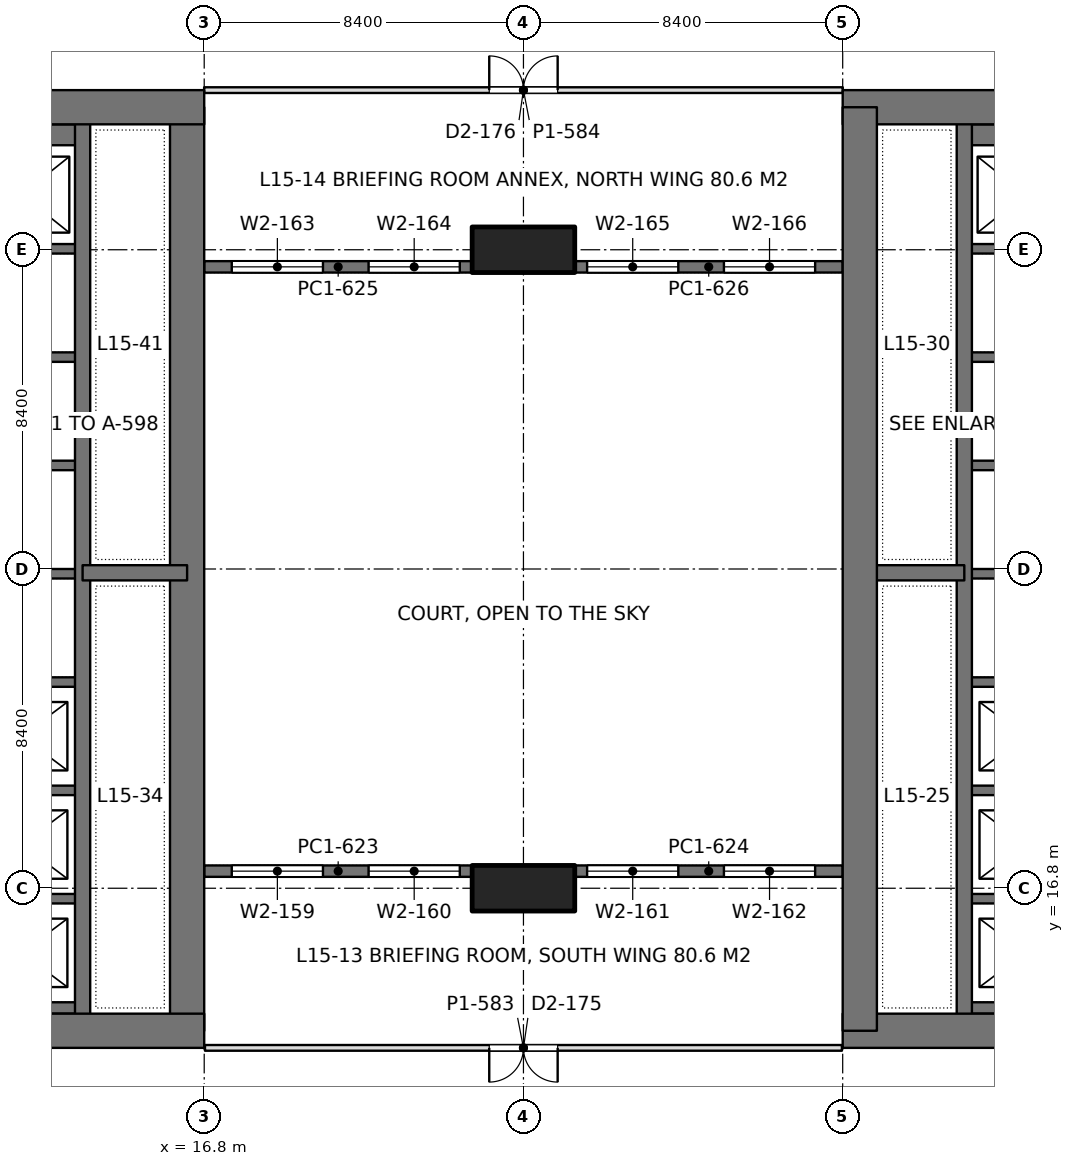
"""IFC4 building model, lengths in metres.
Left out: names, types, materials, properties, quantities, classifications, styles, units other than length and angle.
Written with IfcOpenShell. Run it as: python <this file> out.ifc"""

import sys

from ifc_helpers import new_model, si_unit, direction, frame, frame_2d, origin, origin_2d, place, context, subcontext, project, spatial, rectangle, extrude, element, fill, save


model = new_model("IFC4")
c1 = context("Model", 3, precision=1e-05, world=origin(), true_north=direction((0.0, 1.0)))
c2 = subcontext(c1, "Body", "Model", "MODEL_VIEW")
j1 = project(units=[si_unit("LENGTHUNIT", "METRE"), si_unit("PLANEANGLEUNIT", "RADIAN")], contexts=[c1])
p1 = place(None, origin())
s1 = spatial("IfcSite", under=j1, at=p1, CompositionType="ELEMENT")
p2 = place(p1, origin())
s2 = spatial("IfcBuilding", under=s1, at=p2, CompositionType="ELEMENT")
p3 = place(p2, frame((0.0, 0.0, 68.4)))
s3 = spatial("IfcBuildingStorey", under=s2, at=p3, CompositionType="ELEMENT", Elevation=68.4)
for number, where, z_axis, x_axis in (
    (1, (25.2, 16.8, 0.0), (0.0, 0.0, 1.0), (1.0, 0.0, 0.0)),
    (2, (25.2, 33.6, 0.0), (0.0, 0.0, 1.0), (1.0, 0.0, 0.0)),
):
    element("IfcColumn", number, at=place(p3, frame(where, z_axis=z_axis, x_axis=x_axis)), inside=s3, PredefinedType="COLUMN", context=c2, shape_type="SweptSolid", body=[
        extrude(rectangle(XDim=2.7, YDim=1.2, at=origin_2d()), origin(), (0.0, 0.0, 1.0), 4.5),
    ])
p4 = place(p3, frame((-1.2, 13.05, 0.0), z_axis=(0.0, 0.0, 1.0), x_axis=(1.0, 0.0, 0.0)))
e3 = element("IfcWall", 3, at=p4, inside=s3, PredefinedType="SHEAR", context=c2, shape_type="SweptSolid", body=[
    extrude(rectangle(XDim=18.0, YDim=0.9, at=frame_2d((9.0, 0.0))), origin(), (0.0, 0.0, 1.0), 4.5),
])
p5 = place(p4, frame((8.95, 0.0, 0.0)))
e4 = element("IfcOpeningElement", 4, at=p5, cuts=e3, PredefinedType="OPENING", context=c2, shape_type="SweptSolid", body=[
    extrude(rectangle(XDim=1.8, YDim=2.4, at=frame_2d((0.9, 1.2))), frame((0.0, 0.46, 0.0), z_axis=(0.0, -1.0, 0.0), x_axis=(1.0, 0.0, 0.0)), (0.0, 0.0, 1.0), 0.92),
])
p6 = place(p3, frame((-1.2, 37.35, 0.0), z_axis=(0.0, 0.0, 1.0), x_axis=(1.0, 0.0, 0.0)))
e5 = element("IfcWall", 5, at=p6, inside=s3, PredefinedType="SHEAR", context=c2, shape_type="SweptSolid", body=[
    extrude(rectangle(XDim=18.0, YDim=0.9, at=frame_2d((9.0, 0.0))), origin(), (0.0, 0.0, 1.0), 4.5),
])
p7 = place(p6, frame((8.95, 0.0, 0.0)))
e6 = element("IfcOpeningElement", 6, at=p7, cuts=e5, PredefinedType="OPENING", context=c2, shape_type="SweptSolid", body=[
    extrude(rectangle(XDim=1.8, YDim=2.4, at=frame_2d((0.9, 1.2))), frame((0.0, 0.46, 0.0), z_axis=(0.0, -1.0, 0.0), x_axis=(1.0, 0.0, 0.0)), (0.0, 0.0, 1.0), 0.92),
])
p8 = place(p3, frame((16.35, 13.05, 0.0), z_axis=(0.0, 0.0, 1.0), x_axis=(0.0, 1.0, 0.0)))
e7 = element("IfcWall", 7, at=p8, inside=s3, PredefinedType="SHEAR", context=c2, shape_type="SweptSolid", body=[
    extrude(rectangle(XDim=24.3, YDim=0.9, at=frame_2d((12.15, 0.0))), origin(), (0.0, 0.0, 1.0), 4.5),
])
p9 = place(p3, frame((13.6, 13.05, 0.0), z_axis=(0.0, 0.0, 1.0), x_axis=(0.0, 1.0, 0.0)))
e8 = element("IfcWall", 8, at=p9, inside=s3, PredefinedType="SHEAR", context=c2, shape_type="SweptSolid", body=[
    extrude(rectangle(XDim=24.3, YDim=0.4, at=frame_2d((12.15, 0.0))), origin(), (0.0, 0.0, 1.0), 4.5),
])
p10 = place(p3, frame((13.6, 25.1, 0.0), z_axis=(0.0, 0.0, 1.0), x_axis=(1.0, 0.0, 0.0)))
e9 = element("IfcWall", 9, at=p10, inside=s3, PredefinedType="SHEAR", context=c2, shape_type="SweptSolid", body=[
    extrude(rectangle(XDim=2.75, YDim=0.4, at=frame_2d((1.375, 0.0))), origin(), (0.0, 0.0, 1.0), 4.5),
])
p11 = place(p3, frame((10.4, 13.65, 0.0), z_axis=(0.0, 0.0, 1.0), x_axis=(1.0, 0.0, 0.0)))
e10 = element("IfcWall", 10, at=p11, inside=s3, PredefinedType="SHEAR", context=c2, shape_type="SweptSolid", body=[
    extrude(rectangle(XDim=3.2, YDim=0.3, at=frame_2d((1.6, 0.0))), origin(), (0.0, 0.0, 1.0), 4.5),
])
for number, where, z_axis, x_axis in (
    (11, (10.4, 16.525, 0.0), (0.0, 0.0, 1.0), (1.0, 0.0, 0.0)),
    (12, (10.4, 19.375, 0.0), (0.0, 0.0, 1.0), (1.0, 0.0, 0.0)),
    (13, (10.4, 22.225, 0.0), (0.0, 0.0, 1.0), (1.0, 0.0, 0.0)),
    (14, (10.4, 25.075, 0.0), (0.0, 0.0, 1.0), (1.0, 0.0, 0.0)),
    (15, (10.4, 27.925, 0.0), (0.0, 0.0, 1.0), (1.0, 0.0, 0.0)),
    (16, (10.4, 30.775, 0.0), (0.0, 0.0, 1.0), (1.0, 0.0, 0.0)),
    (17, (10.4, 33.625, 0.0), (0.0, 0.0, 1.0), (1.0, 0.0, 0.0)),
):
    element("IfcWall", number, at=place(p3, frame(where, z_axis=z_axis, x_axis=x_axis)), inside=s3, PredefinedType="SHEAR", context=c2, shape_type="SweptSolid", body=[
        extrude(rectangle(XDim=3.2, YDim=0.25, at=frame_2d((1.6, 0.0))), origin(), (0.0, 0.0, 1.0), 4.5),
    ])
p12 = place(p3, frame((10.4, 36.625, 0.0), z_axis=(0.0, 0.0, 1.0), x_axis=(1.0, 0.0, 0.0)))
e18 = element("IfcWall", 18, at=p12, inside=s3, PredefinedType="SHEAR", context=c2, shape_type="SweptSolid", body=[
    extrude(rectangle(XDim=3.2, YDim=0.55, at=frame_2d((1.6, 0.0))), origin(), (0.0, 0.0, 1.0), 4.5),
])
p13 = place(p3, frame((33.6, 13.05, 0.0), z_axis=(0.0, 0.0, 1.0), x_axis=(1.0, 0.0, 0.0)))
e19 = element("IfcWall", 19, at=p13, inside=s3, PredefinedType="SHEAR", context=c2, shape_type="SweptSolid", body=[
    extrude(rectangle(XDim=18.0, YDim=0.9, at=frame_2d((9.0, 0.0))), origin(), (0.0, 0.0, 1.0), 4.5),
])
p14 = place(p13, frame((7.25, 0.0, 0.0)))
e20 = element("IfcOpeningElement", 20, at=p14, cuts=e19, PredefinedType="OPENING", context=c2, shape_type="SweptSolid", body=[
    extrude(rectangle(XDim=1.8, YDim=2.4, at=frame_2d((0.9, 1.2))), frame((0.0, 0.46, 0.0), z_axis=(0.0, -1.0, 0.0), x_axis=(1.0, 0.0, 0.0)), (0.0, 0.0, 1.0), 0.92),
])
p15 = place(p3, frame((33.6, 37.35, 0.0), z_axis=(0.0, 0.0, 1.0), x_axis=(1.0, 0.0, 0.0)))
e21 = element("IfcWall", 21, at=p15, inside=s3, PredefinedType="SHEAR", context=c2, shape_type="SweptSolid", body=[
    extrude(rectangle(XDim=18.0, YDim=0.9, at=frame_2d((9.0, 0.0))), origin(), (0.0, 0.0, 1.0), 4.5),
])
p16 = place(p15, frame((7.25, 0.0, 0.0)))
e22 = element("IfcOpeningElement", 22, at=p16, cuts=e21, PredefinedType="OPENING", context=c2, shape_type="SweptSolid", body=[
    extrude(rectangle(XDim=1.8, YDim=2.4, at=frame_2d((0.9, 1.2))), frame((0.0, 0.46, 0.0), z_axis=(0.0, -1.0, 0.0), x_axis=(1.0, 0.0, 0.0)), (0.0, 0.0, 1.0), 0.92),
])
p17 = place(p3, frame((34.05, 13.05, 0.0), z_axis=(0.0, 0.0, 1.0), x_axis=(0.0, 1.0, 0.0)))
e23 = element("IfcWall", 23, at=p17, inside=s3, PredefinedType="SHEAR", context=c2, shape_type="SweptSolid", body=[
    extrude(rectangle(XDim=24.3, YDim=0.9, at=frame_2d((12.15, 0.0))), origin(), (0.0, 0.0, 1.0), 4.5),
])
p18 = place(p3, frame((36.8, 13.05, 0.0), z_axis=(0.0, 0.0, 1.0), x_axis=(0.0, 1.0, 0.0)))
e24 = element("IfcWall", 24, at=p18, inside=s3, PredefinedType="SHEAR", context=c2, shape_type="SweptSolid", body=[
    extrude(rectangle(XDim=24.3, YDim=0.4, at=frame_2d((12.15, 0.0))), origin(), (0.0, 0.0, 1.0), 4.5),
])
p19 = place(p3, frame((36.8, 25.1, 0.0), z_axis=(0.0, 0.0, 1.0), x_axis=(-1.0, 0.0, 0.0)))
e25 = element("IfcWall", 25, at=p19, inside=s3, PredefinedType="SHEAR", context=c2, shape_type="SweptSolid", body=[
    extrude(rectangle(XDim=2.75, YDim=0.4, at=frame_2d((1.375, 0.0))), origin(), (0.0, 0.0, 1.0), 4.5),
])
p20 = place(p3, frame((40.0, 13.65, 0.0), z_axis=(0.0, 0.0, 1.0), x_axis=(-1.0, 0.0, 0.0)))
e26 = element("IfcWall", 26, at=p20, inside=s3, PredefinedType="SHEAR", context=c2, shape_type="SweptSolid", body=[
    extrude(rectangle(XDim=3.2, YDim=0.3, at=frame_2d((1.6, 0.0))), origin(), (0.0, 0.0, 1.0), 4.5),
])
for number, where, z_axis, x_axis in (
    (27, (40.0, 16.525, 0.0), (0.0, 0.0, 1.0), (-1.0, 0.0, 0.0)),
    (28, (40.0, 19.375, 0.0), (0.0, 0.0, 1.0), (-1.0, 0.0, 0.0)),
    (29, (40.0, 22.225, 0.0), (0.0, 0.0, 1.0), (-1.0, 0.0, 0.0)),
    (30, (40.0, 25.075, 0.0), (0.0, 0.0, 1.0), (-1.0, 0.0, 0.0)),
    (31, (40.0, 27.925, 0.0), (0.0, 0.0, 1.0), (-1.0, 0.0, 0.0)),
    (32, (40.0, 30.775, 0.0), (0.0, 0.0, 1.0), (-1.0, 0.0, 0.0)),
    (33, (40.0, 33.625, 0.0), (0.0, 0.0, 1.0), (-1.0, 0.0, 0.0)),
):
    element("IfcWall", number, at=place(p3, frame(where, z_axis=z_axis, x_axis=x_axis)), inside=s3, PredefinedType="SHEAR", context=c2, shape_type="SweptSolid", body=[
        extrude(rectangle(XDim=3.2, YDim=0.25, at=frame_2d((1.6, 0.0))), origin(), (0.0, 0.0, 1.0), 4.5),
    ])
p21 = place(p3, frame((40.0, 36.625, 0.0), z_axis=(0.0, 0.0, 1.0), x_axis=(-1.0, 0.0, 0.0)))
e34 = element("IfcWall", 34, at=p21, inside=s3, PredefinedType="SHEAR", context=c2, shape_type="SweptSolid", body=[
    extrude(rectangle(XDim=3.2, YDim=0.55, at=frame_2d((1.6, 0.0))), origin(), (0.0, 0.0, 1.0), 4.5),
])
p22 = place(p3, frame((16.8, 17.25, 0.0), z_axis=(0.0, 0.0, 1.0), x_axis=(1.0, 0.0, 0.0)))
e35 = element("IfcWall", 35, at=p22, inside=s3, PredefinedType="SOLIDWALL", context=c2, shape_type="SweptSolid", body=[
    extrude(rectangle(XDim=7.05, YDim=0.3, at=frame_2d((3.525, 0.0))), origin(), (0.0, 0.0, 1.0), 4.34),
])
p23 = place(p22, frame((0.725, 0.0, 0.9)))
e36 = element("IfcOpeningElement", 36, at=p23, cuts=e35, PredefinedType="OPENING", context=c2, shape_type="SweptSolid", body=[
    extrude(rectangle(XDim=2.4, YDim=1.9, at=frame_2d((1.2, 0.95))), frame((0.0, 0.16, 0.0), z_axis=(0.0, -1.0, 0.0), x_axis=(1.0, 0.0, 0.0)), (0.0, 0.0, 1.0), 0.32),
])
p24 = place(p22, frame((4.325, 0.0, 0.9)))
e37 = element("IfcOpeningElement", 37, at=p24, cuts=e35, PredefinedType="OPENING", context=c2, shape_type="SweptSolid", body=[
    extrude(rectangle(XDim=2.4, YDim=1.9, at=frame_2d((1.2, 0.95))), frame((0.0, 0.16, 0.0), z_axis=(0.0, -1.0, 0.0), x_axis=(1.0, 0.0, 0.0)), (0.0, 0.0, 1.0), 0.32),
])
p25 = place(p3, frame((26.55, 17.25, 0.0), z_axis=(0.0, 0.0, 1.0), x_axis=(1.0, 0.0, 0.0)))
e38 = element("IfcWall", 38, at=p25, inside=s3, PredefinedType="SOLIDWALL", context=c2, shape_type="SweptSolid", body=[
    extrude(rectangle(XDim=7.05, YDim=0.3, at=frame_2d((3.525, 0.0))), origin(), (0.0, 0.0, 1.0), 4.34),
])
p26 = place(p25, frame((0.325, 0.0, 0.9)))
e39 = element("IfcOpeningElement", 39, at=p26, cuts=e38, PredefinedType="OPENING", context=c2, shape_type="SweptSolid", body=[
    extrude(rectangle(XDim=2.4, YDim=1.9, at=frame_2d((1.2, 0.95))), frame((0.0, 0.16, 0.0), z_axis=(0.0, -1.0, 0.0), x_axis=(1.0, 0.0, 0.0)), (0.0, 0.0, 1.0), 0.32),
])
p27 = place(p25, frame((3.925, 0.0, 0.9)))
e40 = element("IfcOpeningElement", 40, at=p27, cuts=e38, PredefinedType="OPENING", context=c2, shape_type="SweptSolid", body=[
    extrude(rectangle(XDim=2.4, YDim=1.9, at=frame_2d((1.2, 0.95))), frame((0.0, 0.16, 0.0), z_axis=(0.0, -1.0, 0.0), x_axis=(1.0, 0.0, 0.0)), (0.0, 0.0, 1.0), 0.32),
])
p28 = place(p3, frame((16.8, 33.15, 0.0), z_axis=(0.0, 0.0, 1.0), x_axis=(1.0, 0.0, 0.0)))
e41 = element("IfcWall", 41, at=p28, inside=s3, PredefinedType="SOLIDWALL", context=c2, shape_type="SweptSolid", body=[
    extrude(rectangle(XDim=7.05, YDim=0.3, at=frame_2d((3.525, 0.0))), origin(), (0.0, 0.0, 1.0), 4.34),
])
p29 = place(p28, frame((0.725, 0.0, 0.9)))
e42 = element("IfcOpeningElement", 42, at=p29, cuts=e41, PredefinedType="OPENING", context=c2, shape_type="SweptSolid", body=[
    extrude(rectangle(XDim=2.4, YDim=1.9, at=frame_2d((1.2, 0.95))), frame((0.0, 0.16, 0.0), z_axis=(0.0, -1.0, 0.0), x_axis=(1.0, 0.0, 0.0)), (0.0, 0.0, 1.0), 0.32),
])
p30 = place(p28, frame((4.325, 0.0, 0.9)))
e43 = element("IfcOpeningElement", 43, at=p30, cuts=e41, PredefinedType="OPENING", context=c2, shape_type="SweptSolid", body=[
    extrude(rectangle(XDim=2.4, YDim=1.9, at=frame_2d((1.2, 0.95))), frame((0.0, 0.16, 0.0), z_axis=(0.0, -1.0, 0.0), x_axis=(1.0, 0.0, 0.0)), (0.0, 0.0, 1.0), 0.32),
])
p31 = place(p3, frame((26.55, 33.15, 0.0), z_axis=(0.0, 0.0, 1.0), x_axis=(1.0, 0.0, 0.0)))
e44 = element("IfcWall", 44, at=p31, inside=s3, PredefinedType="SOLIDWALL", context=c2, shape_type="SweptSolid", body=[
    extrude(rectangle(XDim=7.05, YDim=0.3, at=frame_2d((3.525, 0.0))), origin(), (0.0, 0.0, 1.0), 4.34),
])
p32 = place(p31, frame((0.325, 0.0, 0.9)))
e45 = element("IfcOpeningElement", 45, at=p32, cuts=e44, PredefinedType="OPENING", context=c2, shape_type="SweptSolid", body=[
    extrude(rectangle(XDim=2.4, YDim=1.9, at=frame_2d((1.2, 0.95))), frame((0.0, 0.16, 0.0), z_axis=(0.0, -1.0, 0.0), x_axis=(1.0, 0.0, 0.0)), (0.0, 0.0, 1.0), 0.32),
])
p33 = place(p31, frame((3.925, 0.0, 0.9)))
e46 = element("IfcOpeningElement", 46, at=p33, cuts=e44, PredefinedType="OPENING", context=c2, shape_type="SweptSolid", body=[
    extrude(rectangle(XDim=2.4, YDim=1.9, at=frame_2d((1.2, 0.95))), frame((0.0, 0.16, 0.0), z_axis=(0.0, -1.0, 0.0), x_axis=(1.0, 0.0, 0.0)), (0.0, 0.0, 1.0), 0.32),
])
p34 = place(p3, frame((16.82, 12.6, 0.0), z_axis=(0.0, 0.0, 1.0), x_axis=(1.0, 0.0, 0.0)))
e47 = element("IfcWall", 47, at=p34, inside=s3, PredefinedType="PARTITIONING", context=c2, shape_type="SweptSolid", body=[
    extrude(rectangle(XDim=16.76, YDim=0.15, at=frame_2d((8.38, 0.0))), origin(), (0.0, 0.0, 1.0), 3.74),
])
p35 = place(p34, frame((7.48, 0.0, 0.0)))
e48 = element("IfcOpeningElement", 48, at=p35, cuts=e47, PredefinedType="OPENING", context=c2, shape_type="SweptSolid", body=[
    extrude(rectangle(XDim=1.8, YDim=2.2, at=frame_2d((0.9, 1.1))), frame((0.0, 0.085, 0.0), z_axis=(0.0, -1.0, 0.0), x_axis=(1.0, 0.0, 0.0)), (0.0, 0.0, 1.0), 0.17),
])
p36 = place(p3, frame((16.798, 37.8, 0.0), z_axis=(0.0, 0.0, 1.0), x_axis=(1.0, 0.0, 0.0)))
e49 = element("IfcWall", 49, at=p36, inside=s3, PredefinedType="PARTITIONING", context=c2, shape_type="SweptSolid", body=[
    extrude(rectangle(XDim=16.804, YDim=0.15, at=frame_2d((8.402, 0.0))), origin(), (0.0, 0.0, 1.0), 3.74),
])
p37 = place(p36, frame((7.502, 0.0, 0.0)))
e50 = element("IfcOpeningElement", 50, at=p37, cuts=e49, PredefinedType="OPENING", context=c2, shape_type="SweptSolid", body=[
    extrude(rectangle(XDim=1.8, YDim=2.2, at=frame_2d((0.9, 1.1))), frame((0.0, 0.085, 0.0), z_axis=(0.0, -1.0, 0.0), x_axis=(1.0, 0.0, 0.0)), (0.0, 0.0, 1.0), 0.17),
])
p38 = place(p23, origin())
e51 = element("IfcWindow", 51, at=p38, inside=s3, PartitioningType="SINGLE_PANEL", PredefinedType="WINDOW", context=c2, shape_type="SweptSolid", body=[
    extrude(rectangle(XDim=2.4, YDim=1.9, at=frame_2d((1.2, 0.95))), frame((0.0, 0.03, 0.0), z_axis=(0.0, -1.0, 0.0), x_axis=(1.0, 0.0, 0.0)), (0.0, 0.0, 1.0), 0.06),
])
fill(e36, e51)
p39 = place(p24, origin())
e52 = element("IfcWindow", 52, at=p39, inside=s3, PartitioningType="SINGLE_PANEL", PredefinedType="WINDOW", context=c2, shape_type="SweptSolid", body=[
    extrude(rectangle(XDim=2.4, YDim=1.9, at=frame_2d((1.2, 0.95))), frame((0.0, 0.03, 0.0), z_axis=(0.0, -1.0, 0.0), x_axis=(1.0, 0.0, 0.0)), (0.0, 0.0, 1.0), 0.06),
])
fill(e37, e52)
p40 = place(p26, origin())
e53 = element("IfcWindow", 53, at=p40, inside=s3, PartitioningType="SINGLE_PANEL", PredefinedType="WINDOW", context=c2, shape_type="SweptSolid", body=[
    extrude(rectangle(XDim=2.4, YDim=1.9, at=frame_2d((1.2, 0.95))), frame((0.0, 0.03, 0.0), z_axis=(0.0, -1.0, 0.0), x_axis=(1.0, 0.0, 0.0)), (0.0, 0.0, 1.0), 0.06),
])
fill(e39, e53)
p41 = place(p27, origin())
e54 = element("IfcWindow", 54, at=p41, inside=s3, PartitioningType="SINGLE_PANEL", PredefinedType="WINDOW", context=c2, shape_type="SweptSolid", body=[
    extrude(rectangle(XDim=2.4, YDim=1.9, at=frame_2d((1.2, 0.95))), frame((0.0, 0.03, 0.0), z_axis=(0.0, -1.0, 0.0), x_axis=(1.0, 0.0, 0.0)), (0.0, 0.0, 1.0), 0.06),
])
fill(e40, e54)
p42 = place(p29, origin())
e55 = element("IfcWindow", 55, at=p42, inside=s3, PartitioningType="SINGLE_PANEL", PredefinedType="WINDOW", context=c2, shape_type="SweptSolid", body=[
    extrude(rectangle(XDim=2.4, YDim=1.9, at=frame_2d((1.2, 0.95))), frame((0.0, 0.03, 0.0), z_axis=(0.0, -1.0, 0.0), x_axis=(1.0, 0.0, 0.0)), (0.0, 0.0, 1.0), 0.06),
])
fill(e42, e55)
p43 = place(p30, origin())
e56 = element("IfcWindow", 56, at=p43, inside=s3, PartitioningType="SINGLE_PANEL", PredefinedType="WINDOW", context=c2, shape_type="SweptSolid", body=[
    extrude(rectangle(XDim=2.4, YDim=1.9, at=frame_2d((1.2, 0.95))), frame((0.0, 0.03, 0.0), z_axis=(0.0, -1.0, 0.0), x_axis=(1.0, 0.0, 0.0)), (0.0, 0.0, 1.0), 0.06),
])
fill(e43, e56)
p44 = place(p32, origin())
e57 = element("IfcWindow", 57, at=p44, inside=s3, PartitioningType="SINGLE_PANEL", PredefinedType="WINDOW", context=c2, shape_type="SweptSolid", body=[
    extrude(rectangle(XDim=2.4, YDim=1.9, at=frame_2d((1.2, 0.95))), frame((0.0, 0.03, 0.0), z_axis=(0.0, -1.0, 0.0), x_axis=(1.0, 0.0, 0.0)), (0.0, 0.0, 1.0), 0.06),
])
fill(e45, e57)
p45 = place(p33, origin())
e58 = element("IfcWindow", 58, at=p45, inside=s3, PartitioningType="SINGLE_PANEL", PredefinedType="WINDOW", context=c2, shape_type="SweptSolid", body=[
    extrude(rectangle(XDim=2.4, YDim=1.9, at=frame_2d((1.2, 0.95))), frame((0.0, 0.03, 0.0), z_axis=(0.0, -1.0, 0.0), x_axis=(1.0, 0.0, 0.0)), (0.0, 0.0, 1.0), 0.06),
])
fill(e46, e58)
p46 = place(p35, frame((1.8, 0.0, 0.0), z_axis=(0.0, 0.0, 1.0), x_axis=(-1.0, 0.0, 0.0)))
e59 = element("IfcDoor", 59, at=p46, inside=s3, OperationType="DOUBLE_DOOR_SINGLE_SWING", PredefinedType="DOOR", context=c2, shape_type="SweptSolid", body=[
    extrude(rectangle(XDim=1.8, YDim=2.2, at=frame_2d((0.9, 1.1))), frame((0.0, 0.025, 0.0), z_axis=(0.0, -1.0, 0.0), x_axis=(1.0, 0.0, 0.0)), (0.0, 0.0, 1.0), 0.05),
])
fill(e48, e59)
p47 = place(p37, origin())
e60 = element("IfcDoor", 60, at=p47, inside=s3, OperationType="DOUBLE_DOOR_SINGLE_SWING", PredefinedType="DOOR", context=c2, shape_type="SweptSolid", body=[
    extrude(rectangle(XDim=1.8, YDim=2.2, at=frame_2d((0.9, 1.1))), frame((0.0, 0.025, 0.0), z_axis=(0.0, -1.0, 0.0), x_axis=(1.0, 0.0, 0.0)), (0.0, 0.0, 1.0), 0.05),
])
fill(e50, e60)
save(model, sys.argv[1])
